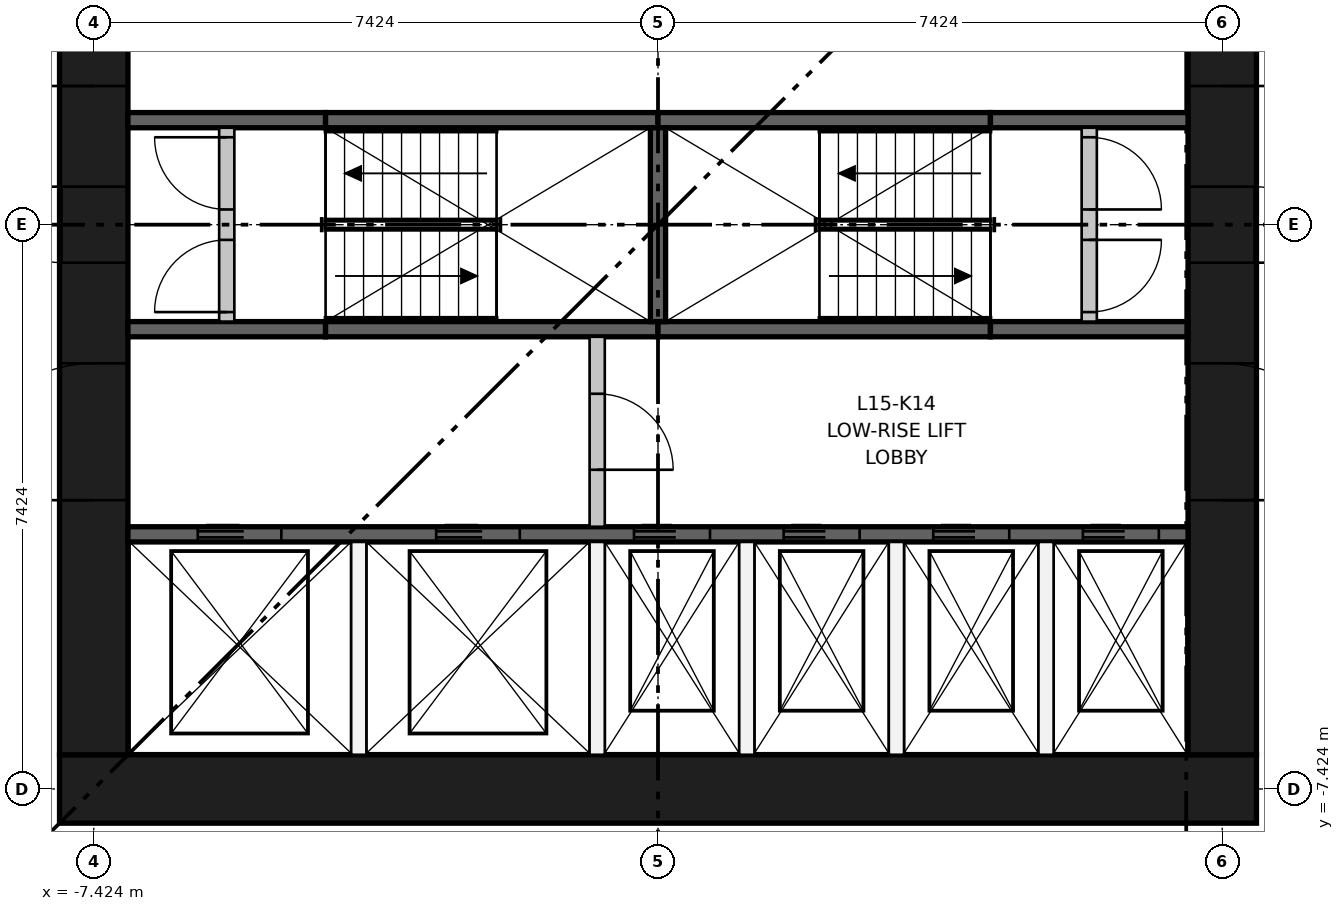
"""IFC4 building model, lengths in metres.
Left out: names, types, materials, properties, quantities, classifications, styles, units other than length and angle.
Written with IfcOpenShell. Run it as: python <this file> out.ifc"""

import sys

from ifc_helpers import new_model, si_unit, direction, frame, frame_2d, origin, place, context, subcontext, project, spatial, rectangle, extrude, element, fill, save


model = new_model("IFC4")
c1 = context("Model", 3, precision=1e-05, world=origin(), true_north=direction((0.0, 1.0)))
c2 = subcontext(c1, "Body", "Model", "MODEL_VIEW")
j1 = project(units=[si_unit("LENGTHUNIT", "METRE"), si_unit("PLANEANGLEUNIT", "RADIAN")], contexts=[c1])
p1 = place(None, origin())
s1 = spatial("IfcSite", under=j1, at=p1, CompositionType="ELEMENT")
p2 = place(p1, origin())
s2 = spatial("IfcBuilding", under=s1, at=p2, CompositionType="ELEMENT")
p3 = place(p2, frame((0.0, 0.0, 59.05)))
s3 = spatial("IfcBuildingStorey", under=s2, at=p3, CompositionType="ELEMENT", Elevation=59.05)
p4 = place(p3, frame((-7.874, -7.424, 0.0), z_axis=(0.0, 0.0, 1.0), x_axis=(1.0, 0.0, 0.0)))
e1 = element("IfcWall", 1, at=p4, inside=s3, PredefinedType="SHEAR", context=c2, shape_type="SweptSolid", body=[
    extrude(rectangle(XDim=15.748, YDim=0.9, at=frame_2d((7.874, 0.0))), origin(), (0.0, 0.0, 1.0), 3.65),
])
p5 = place(p3, frame((-7.424, -6.974, 0.0), z_axis=(0.0, 0.0, 1.0), x_axis=(0.0, 1.0, 0.0)))
e2 = element("IfcWall", 2, at=p5, inside=s3, PredefinedType="SHEAR", context=c2, shape_type="SweptSolid", body=[
    extrude(rectangle(XDim=13.948, YDim=0.9, at=frame_2d((6.974, 0.0))), origin(), (0.0, 0.0, 1.0), 3.65),
])
p6 = place(p5, frame((6.474, 0.0, 0.0)))
e3 = element("IfcOpeningElement", 3, at=p6, cuts=e2, PredefinedType="OPENING", context=c2, shape_type="SweptSolid", body=[
    extrude(rectangle(XDim=1.0, YDim=2.1, at=frame_2d((0.5, 1.05))), frame((0.0, 0.46, 0.0), z_axis=(0.0, -1.0, 0.0), x_axis=(1.0, 0.0, 0.0)), (0.0, 0.0, 1.0), 0.92),
])
p7 = place(p5, frame((3.35, 0.0, 0.0)))
e4 = element("IfcOpeningElement", 4, at=p7, cuts=e2, PredefinedType="OPENING", context=c2, shape_type="SweptSolid", body=[
    extrude(rectangle(XDim=1.8, YDim=2.1, at=frame_2d((0.9, 1.05))), frame((0.0, 0.46, 0.0), z_axis=(0.0, -1.0, 0.0), x_axis=(1.0, 0.0, 0.0)), (0.0, 0.0, 1.0), 0.92),
])
p8 = place(p5, frame((8.799, 0.0, 0.0)))
e5 = element("IfcOpeningElement", 5, at=p8, cuts=e2, PredefinedType="OPENING", context=c2, shape_type="SweptSolid", body=[
    extrude(rectangle(XDim=1.8, YDim=2.1, at=frame_2d((0.9, 1.05))), frame((0.0, 0.46, 0.0), z_axis=(0.0, -1.0, 0.0), x_axis=(1.0, 0.0, 0.0)), (0.0, 0.0, 1.0), 0.92),
])
p9 = place(p5, frame((11.974, 0.0, 0.0)))
e6 = element("IfcOpeningElement", 6, at=p9, cuts=e2, PredefinedType="OPENING", context=c2, shape_type="SweptSolid", body=[
    extrude(rectangle(XDim=1.0, YDim=2.1, at=frame_2d((0.5, 1.05))), frame((0.0, 0.46, 0.0), z_axis=(0.0, -1.0, 0.0), x_axis=(1.0, 0.0, 0.0)), (0.0, 0.0, 1.0), 0.92),
])
p10 = place(p3, frame((7.424, -6.974, 0.0), z_axis=(0.0, 0.0, 1.0), x_axis=(0.0, 1.0, 0.0)))
e7 = element("IfcWall", 7, at=p10, inside=s3, PredefinedType="SHEAR", context=c2, shape_type="SweptSolid", body=[
    extrude(rectangle(XDim=13.948, YDim=0.9, at=frame_2d((6.974, 0.0))), origin(), (0.0, 0.0, 1.0), 3.65),
])
p11 = place(p10, frame((6.474, 0.0, 0.0)))
e8 = element("IfcOpeningElement", 8, at=p11, cuts=e7, PredefinedType="OPENING", context=c2, shape_type="SweptSolid", body=[
    extrude(rectangle(XDim=1.0, YDim=2.1, at=frame_2d((0.5, 1.05))), frame((0.0, 0.46, 0.0), z_axis=(0.0, -1.0, 0.0), x_axis=(1.0, 0.0, 0.0)), (0.0, 0.0, 1.0), 0.92),
])
p12 = place(p10, frame((3.35, 0.0, 0.0)))
e9 = element("IfcOpeningElement", 9, at=p12, cuts=e7, PredefinedType="OPENING", context=c2, shape_type="SweptSolid", body=[
    extrude(rectangle(XDim=1.8, YDim=2.1, at=frame_2d((0.9, 1.05))), frame((0.0, 0.46, 0.0), z_axis=(0.0, -1.0, 0.0), x_axis=(1.0, 0.0, 0.0)), (0.0, 0.0, 1.0), 0.92),
])
p13 = place(p10, frame((8.799, 0.0, 0.0)))
e10 = element("IfcOpeningElement", 10, at=p13, cuts=e7, PredefinedType="OPENING", context=c2, shape_type="SweptSolid", body=[
    extrude(rectangle(XDim=1.8, YDim=2.1, at=frame_2d((0.9, 1.05))), frame((0.0, 0.46, 0.0), z_axis=(0.0, -1.0, 0.0), x_axis=(1.0, 0.0, 0.0)), (0.0, 0.0, 1.0), 0.92),
])
p14 = place(p3, frame((-6.974, -4.074, 0.0), z_axis=(0.0, 0.0, 1.0), x_axis=(1.0, 0.0, 0.0)))
e11 = element("IfcWall", 11, at=p14, inside=s3, PredefinedType="SHEAR", context=c2, shape_type="SweptSolid", body=[
    extrude(rectangle(XDim=13.948, YDim=0.2, at=frame_2d((6.974, 0.0))), origin(), (0.0, 0.0, 1.0), 3.3),
])
p15 = place(p14, frame((0.918, 0.0, 0.0)))
e12 = element("IfcOpeningElement", 12, at=p15, cuts=e11, PredefinedType="OPENING", context=c2, shape_type="SweptSolid", body=[
    extrude(rectangle(XDim=1.1, YDim=2.1, at=frame_2d((0.55, 1.05))), frame((0.0, 0.11, 0.0), z_axis=(0.0, -1.0, 0.0), x_axis=(1.0, 0.0, 0.0)), (0.0, 0.0, 1.0), 0.22),
])
p16 = place(p14, frame((4.055, 0.0, 0.0)))
e13 = element("IfcOpeningElement", 13, at=p16, cuts=e11, PredefinedType="OPENING", context=c2, shape_type="SweptSolid", body=[
    extrude(rectangle(XDim=1.1, YDim=2.1, at=frame_2d((0.55, 1.05))), frame((0.0, 0.11, 0.0), z_axis=(0.0, -1.0, 0.0), x_axis=(1.0, 0.0, 0.0)), (0.0, 0.0, 1.0), 0.22),
])
p17 = place(p14, frame((6.658, 0.0, 0.0)))
e14 = element("IfcOpeningElement", 14, at=p17, cuts=e11, PredefinedType="OPENING", context=c2, shape_type="SweptSolid", body=[
    extrude(rectangle(XDim=1.0, YDim=2.1, at=frame_2d((0.5, 1.05))), frame((0.0, 0.11, 0.0), z_axis=(0.0, -1.0, 0.0), x_axis=(1.0, 0.0, 0.0)), (0.0, 0.0, 1.0), 0.22),
])
p18 = place(p14, frame((8.627, 0.0, 0.0)))
e15 = element("IfcOpeningElement", 15, at=p18, cuts=e11, PredefinedType="OPENING", context=c2, shape_type="SweptSolid", body=[
    extrude(rectangle(XDim=1.0, YDim=2.1, at=frame_2d((0.5, 1.05))), frame((0.0, 0.11, 0.0), z_axis=(0.0, -1.0, 0.0), x_axis=(1.0, 0.0, 0.0)), (0.0, 0.0, 1.0), 0.22),
])
p19 = place(p14, frame((10.595, 0.0, 0.0)))
e16 = element("IfcOpeningElement", 16, at=p19, cuts=e11, PredefinedType="OPENING", context=c2, shape_type="SweptSolid", body=[
    extrude(rectangle(XDim=1.0, YDim=2.1, at=frame_2d((0.5, 1.05))), frame((0.0, 0.11, 0.0), z_axis=(0.0, -1.0, 0.0), x_axis=(1.0, 0.0, 0.0)), (0.0, 0.0, 1.0), 0.22),
])
p20 = place(p14, frame((12.564, 0.0, 0.0)))
e17 = element("IfcOpeningElement", 17, at=p20, cuts=e11, PredefinedType="OPENING", context=c2, shape_type="SweptSolid", body=[
    extrude(rectangle(XDim=1.0, YDim=2.1, at=frame_2d((0.5, 1.05))), frame((0.0, 0.11, 0.0), z_axis=(0.0, -1.0, 0.0), x_axis=(1.0, 0.0, 0.0)), (0.0, 0.0, 1.0), 0.22),
])
p21 = place(p3, frame((-6.974, -1.375, 0.0), z_axis=(0.0, 0.0, 1.0), x_axis=(1.0, 0.0, 0.0)))
e18 = element("IfcWall", 18, at=p21, inside=s3, PredefinedType="SHEAR", context=c2, shape_type="SweptSolid", body=[
    extrude(rectangle(XDim=2.6, YDim=0.2, at=frame_2d((1.3, 0.0))), origin(), (0.0, 0.0, 1.0), 3.3),
])
for number, where, z_axis, x_axis in (
    (19, (-4.374, -1.375, 0.0), (0.0, 0.0, 1.0), (1.0, 0.0, 0.0)),
    (20, (0.0, -1.375, 0.0), (0.0, 0.0, 1.0), (1.0, 0.0, 0.0)),
):
    element("IfcWall", number, at=place(p3, frame(where, z_axis=z_axis, x_axis=x_axis)), inside=s3, PredefinedType="SHEAR", context=c2, shape_type="SweptSolid", body=[
        extrude(rectangle(XDim=4.374, YDim=0.2, at=frame_2d((2.187, 0.0))), origin(), (0.0, 0.0, 1.0), 3.3),
    ])
for number, where, z_axis, x_axis in (
    (21, (4.374, -1.375, 0.0), (0.0, 0.0, 1.0), (1.0, 0.0, 0.0)),
    (22, (-6.974, 1.375, 0.0), (0.0, 0.0, 1.0), (1.0, 0.0, 0.0)),
):
    element("IfcWall", number, at=place(p3, frame(where, z_axis=z_axis, x_axis=x_axis)), inside=s3, PredefinedType="SHEAR", context=c2, shape_type="SweptSolid", body=[
        extrude(rectangle(XDim=2.6, YDim=0.2, at=frame_2d((1.3, 0.0))), origin(), (0.0, 0.0, 1.0), 3.3),
    ])
for number, where, z_axis, x_axis in (
    (23, (-4.374, 1.375, 0.0), (0.0, 0.0, 1.0), (1.0, 0.0, 0.0)),
    (24, (0.0, 1.375, 0.0), (0.0, 0.0, 1.0), (1.0, 0.0, 0.0)),
):
    element("IfcWall", number, at=place(p3, frame(where, z_axis=z_axis, x_axis=x_axis)), inside=s3, PredefinedType="SHEAR", context=c2, shape_type="SweptSolid", body=[
        extrude(rectangle(XDim=4.374, YDim=0.2, at=frame_2d((2.187, 0.0))), origin(), (0.0, 0.0, 1.0), 3.3),
    ])
p22 = place(p3, frame((4.374, 1.375, 0.0), z_axis=(0.0, 0.0, 1.0), x_axis=(1.0, 0.0, 0.0)))
e25 = element("IfcWall", 25, at=p22, inside=s3, PredefinedType="SHEAR", context=c2, shape_type="SweptSolid", body=[
    extrude(rectangle(XDim=2.6, YDim=0.2, at=frame_2d((1.3, 0.0))), origin(), (0.0, 0.0, 1.0), 3.3),
])
p23 = place(p3, frame((0.0, -1.275, 0.0), z_axis=(0.0, 0.0, 1.0), x_axis=(0.0, 1.0, 0.0)))
e26 = element("IfcWall", 26, at=p23, inside=s3, PredefinedType="SHEAR", context=c2, shape_type="SweptSolid", body=[
    extrude(rectangle(XDim=2.55, YDim=0.2, at=frame_2d((1.275, 0.0))), origin(), (0.0, 0.0, 1.0), 3.3),
])
for number, where, z_axis, x_axis in (
    (27, (-3.937, -6.974, 0.0), (0.0, 0.0, 1.0), (0.0, 1.0, 0.0)),
    (28, (-0.8, -6.974, 0.0), (0.0, 0.0, 1.0), (0.0, 1.0, 0.0)),
):
    element("IfcWall", number, at=place(p3, frame(where, z_axis=z_axis, x_axis=x_axis)), inside=s3, PredefinedType="PARTITIONING", context=c2, shape_type="SweptSolid", body=[
        extrude(rectangle(XDim=2.8, YDim=0.2, at=frame_2d((1.4, 0.0))), origin(), (0.0, 0.0, 1.0), 3.3),
    ])
p24 = place(p3, frame((-0.8, -3.974, 0.0), z_axis=(0.0, 0.0, 1.0), x_axis=(0.0, 1.0, 0.0)))
e29 = element("IfcWall", 29, at=p24, inside=s3, PredefinedType="PARTITIONING", context=c2, shape_type="SweptSolid", body=[
    extrude(rectangle(XDim=2.499, YDim=0.2, at=frame_2d((1.25, 0.0))), origin(), (0.0, 0.0, 1.0), 3.3),
])
p25 = place(p24, frame((0.75, 0.0, 0.0)))
e30 = element("IfcOpeningElement", 30, at=p25, cuts=e29, PredefinedType="OPENING", context=c2, shape_type="SweptSolid", body=[
    extrude(rectangle(XDim=1.0, YDim=2.1, at=frame_2d((0.5, 1.05))), frame((0.0, 0.11, 0.0), z_axis=(0.0, -1.0, 0.0), x_axis=(1.0, 0.0, 0.0)), (0.0, 0.0, 1.0), 0.22),
])
for number, where, z_axis, x_axis in (
    (31, (1.168, -6.974, 0.0), (0.0, 0.0, 1.0), (0.0, 1.0, 0.0)),
    (32, (3.137, -6.974, 0.0), (0.0, 0.0, 1.0), (0.0, 1.0, 0.0)),
    (33, (5.105, -6.974, 0.0), (0.0, 0.0, 1.0), (0.0, 1.0, 0.0)),
):
    element("IfcWall", number, at=place(p3, frame(where, z_axis=z_axis, x_axis=x_axis)), inside=s3, PredefinedType="PARTITIONING", context=c2, shape_type="SweptSolid", body=[
        extrude(rectangle(XDim=2.8, YDim=0.2, at=frame_2d((1.4, 0.0))), origin(), (0.0, 0.0, 1.0), 3.3),
    ])
p26 = place(p3, frame((-5.674, -1.275, 0.0), z_axis=(0.0, 0.0, 1.0), x_axis=(0.0, 1.0, 0.0)))
e34 = element("IfcWall", 34, at=p26, inside=s3, PredefinedType="PARTITIONING", context=c2, shape_type="SweptSolid", body=[
    extrude(rectangle(XDim=2.55, YDim=0.2, at=frame_2d((1.275, 0.0))), origin(), (0.0, 0.0, 1.0), 3.3),
])
p27 = place(p26, frame((0.125, 0.0, 0.0)))
e35 = element("IfcOpeningElement", 35, at=p27, cuts=e34, PredefinedType="OPENING", context=c2, shape_type="SweptSolid", body=[
    extrude(rectangle(XDim=0.95, YDim=2.1, at=frame_2d((0.475, 1.05))), frame((0.0, 0.11, 0.0), z_axis=(0.0, -1.0, 0.0), x_axis=(1.0, 0.0, 0.0)), (0.0, 0.0, 1.0), 0.22),
])
p28 = place(p26, frame((1.475, 0.0, 0.0)))
e36 = element("IfcOpeningElement", 36, at=p28, cuts=e34, PredefinedType="OPENING", context=c2, shape_type="SweptSolid", body=[
    extrude(rectangle(XDim=0.95, YDim=2.1, at=frame_2d((0.475, 1.05))), frame((0.0, 0.11, 0.0), z_axis=(0.0, -1.0, 0.0), x_axis=(1.0, 0.0, 0.0)), (0.0, 0.0, 1.0), 0.22),
])
p29 = place(p3, frame((5.674, -1.275, 0.0), z_axis=(0.0, 0.0, 1.0), x_axis=(0.0, 1.0, 0.0)))
e37 = element("IfcWall", 37, at=p29, inside=s3, PredefinedType="PARTITIONING", context=c2, shape_type="SweptSolid", body=[
    extrude(rectangle(XDim=2.55, YDim=0.2, at=frame_2d((1.275, 0.0))), origin(), (0.0, 0.0, 1.0), 3.3),
])
p30 = place(p29, frame((0.125, 0.0, 0.0)))
e38 = element("IfcOpeningElement", 38, at=p30, cuts=e37, PredefinedType="OPENING", context=c2, shape_type="SweptSolid", body=[
    extrude(rectangle(XDim=0.95, YDim=2.1, at=frame_2d((0.475, 1.05))), frame((0.0, 0.11, 0.0), z_axis=(0.0, -1.0, 0.0), x_axis=(1.0, 0.0, 0.0)), (0.0, 0.0, 1.0), 0.22),
])
p31 = place(p29, frame((1.475, 0.0, 0.0)))
e39 = element("IfcOpeningElement", 39, at=p31, cuts=e37, PredefinedType="OPENING", context=c2, shape_type="SweptSolid", body=[
    extrude(rectangle(XDim=0.95, YDim=2.1, at=frame_2d((0.475, 1.05))), frame((0.0, 0.11, 0.0), z_axis=(0.0, -1.0, 0.0), x_axis=(1.0, 0.0, 0.0)), (0.0, 0.0, 1.0), 0.22),
])
p32 = place(p15, origin())
e40 = element("IfcDoor", 40, at=p32, inside=s3, OperationType="DOUBLE_DOOR_SLIDING", PredefinedType="DOOR", context=c2, shape_type="SweptSolid", body=[
    extrude(rectangle(XDim=1.1, YDim=2.1, at=frame_2d((0.55, 1.05))), frame((0.0, 0.025, 0.0), z_axis=(0.0, -1.0, 0.0), x_axis=(1.0, 0.0, 0.0)), (0.0, 0.0, 1.0), 0.05),
])
fill(e12, e40)
p33 = place(p16, origin())
e41 = element("IfcDoor", 41, at=p33, inside=s3, OperationType="DOUBLE_DOOR_SLIDING", PredefinedType="DOOR", context=c2, shape_type="SweptSolid", body=[
    extrude(rectangle(XDim=1.1, YDim=2.1, at=frame_2d((0.55, 1.05))), frame((0.0, 0.025, 0.0), z_axis=(0.0, -1.0, 0.0), x_axis=(1.0, 0.0, 0.0)), (0.0, 0.0, 1.0), 0.05),
])
fill(e13, e41)
p34 = place(p17, origin())
e42 = element("IfcDoor", 42, at=p34, inside=s3, OperationType="DOUBLE_DOOR_SLIDING", PredefinedType="DOOR", context=c2, shape_type="SweptSolid", body=[
    extrude(rectangle(XDim=1.0, YDim=2.1, at=frame_2d((0.5, 1.05))), frame((0.0, 0.025, 0.0), z_axis=(0.0, -1.0, 0.0), x_axis=(1.0, 0.0, 0.0)), (0.0, 0.0, 1.0), 0.05),
])
fill(e14, e42)
p35 = place(p18, origin())
e43 = element("IfcDoor", 43, at=p35, inside=s3, OperationType="DOUBLE_DOOR_SLIDING", PredefinedType="DOOR", context=c2, shape_type="SweptSolid", body=[
    extrude(rectangle(XDim=1.0, YDim=2.1, at=frame_2d((0.5, 1.05))), frame((0.0, 0.025, 0.0), z_axis=(0.0, -1.0, 0.0), x_axis=(1.0, 0.0, 0.0)), (0.0, 0.0, 1.0), 0.05),
])
fill(e15, e43)
p36 = place(p19, origin())
e44 = element("IfcDoor", 44, at=p36, inside=s3, OperationType="DOUBLE_DOOR_SLIDING", PredefinedType="DOOR", context=c2, shape_type="SweptSolid", body=[
    extrude(rectangle(XDim=1.0, YDim=2.1, at=frame_2d((0.5, 1.05))), frame((0.0, 0.025, 0.0), z_axis=(0.0, -1.0, 0.0), x_axis=(1.0, 0.0, 0.0)), (0.0, 0.0, 1.0), 0.05),
])
fill(e16, e44)
p37 = place(p20, origin())
e45 = element("IfcDoor", 45, at=p37, inside=s3, OperationType="DOUBLE_DOOR_SLIDING", PredefinedType="DOOR", context=c2, shape_type="SweptSolid", body=[
    extrude(rectangle(XDim=1.0, YDim=2.1, at=frame_2d((0.5, 1.05))), frame((0.0, 0.025, 0.0), z_axis=(0.0, -1.0, 0.0), x_axis=(1.0, 0.0, 0.0)), (0.0, 0.0, 1.0), 0.05),
])
fill(e17, e45)
p38 = place(p27, origin())
e46 = element("IfcDoor", 46, at=p38, inside=s3, OperationType="SINGLE_SWING_LEFT", PredefinedType="DOOR", context=c2, shape_type="SweptSolid", body=[
    extrude(rectangle(XDim=0.95, YDim=2.1, at=frame_2d((0.475, 1.05))), frame((0.0, 0.025, 0.0), z_axis=(0.0, -1.0, 0.0), x_axis=(1.0, 0.0, 0.0)), (0.0, 0.0, 1.0), 0.05),
])
fill(e35, e46)
p39 = place(p28, origin())
e47 = element("IfcDoor", 47, at=p39, inside=s3, OperationType="SINGLE_SWING_RIGHT", PredefinedType="DOOR", context=c2, shape_type="SweptSolid", body=[
    extrude(rectangle(XDim=0.95, YDim=2.1, at=frame_2d((0.475, 1.05))), frame((0.0, 0.025, 0.0), z_axis=(0.0, -1.0, 0.0), x_axis=(1.0, 0.0, 0.0)), (0.0, 0.0, 1.0), 0.05),
])
fill(e36, e47)
p40 = place(p30, frame((0.95, 0.0, 0.0), z_axis=(0.0, 0.0, 1.0), x_axis=(-1.0, 0.0, 0.0)))
e48 = element("IfcDoor", 48, at=p40, inside=s3, OperationType="SINGLE_SWING_RIGHT", PredefinedType="DOOR", context=c2, shape_type="SweptSolid", body=[
    extrude(rectangle(XDim=0.95, YDim=2.1, at=frame_2d((0.475, 1.05))), frame((0.0, 0.025, 0.0), z_axis=(0.0, -1.0, 0.0), x_axis=(1.0, 0.0, 0.0)), (0.0, 0.0, 1.0), 0.05),
])
fill(e38, e48)
p41 = place(p31, frame((0.95, 0.0, 0.0), z_axis=(0.0, 0.0, 1.0), x_axis=(-1.0, 0.0, 0.0)))
e49 = element("IfcDoor", 49, at=p41, inside=s3, OperationType="SINGLE_SWING_LEFT", PredefinedType="DOOR", context=c2, shape_type="SweptSolid", body=[
    extrude(rectangle(XDim=0.95, YDim=2.1, at=frame_2d((0.475, 1.05))), frame((0.0, 0.025, 0.0), z_axis=(0.0, -1.0, 0.0), x_axis=(1.0, 0.0, 0.0)), (0.0, 0.0, 1.0), 0.05),
])
fill(e39, e49)
p42 = place(p25, frame((1.0, 0.0, 0.0), z_axis=(0.0, 0.0, 1.0), x_axis=(-1.0, 0.0, 0.0)))
e50 = element("IfcDoor", 50, at=p42, inside=s3, OperationType="SINGLE_SWING_LEFT", PredefinedType="DOOR", context=c2, shape_type="SweptSolid", body=[
    extrude(rectangle(XDim=1.0, YDim=2.1, at=frame_2d((0.5, 1.05))), frame((0.0, 0.025, 0.0), z_axis=(0.0, -1.0, 0.0), x_axis=(1.0, 0.0, 0.0)), (0.0, 0.0, 1.0), 0.05),
])
fill(e30, e50)
p43 = place(p6, origin())
e51 = element("IfcDoor", 51, at=p43, inside=s3, OperationType="SINGLE_SWING_RIGHT", PredefinedType="DOOR", context=c2, shape_type="SweptSolid", body=[
    extrude(rectangle(XDim=1.0, YDim=2.1, at=frame_2d((0.5, 1.05))), frame((0.0, 0.45, 0.0), z_axis=(0.0, -1.0, 0.0), x_axis=(1.0, 0.0, 0.0)), (0.0, 0.0, 1.0), 0.05),
])
fill(e3, e51)
p44 = place(p7, origin())
e52 = element("IfcDoor", 52, at=p44, inside=s3, OperationType="DOUBLE_DOOR_SINGLE_SWING", PredefinedType="DOOR", context=c2, shape_type="SweptSolid", body=[
    extrude(rectangle(XDim=1.8, YDim=2.1, at=frame_2d((0.9, 1.05))), frame((0.0, 0.025, 0.0), z_axis=(0.0, -1.0, 0.0), x_axis=(1.0, 0.0, 0.0)), (0.0, 0.0, 1.0), 0.05),
])
fill(e4, e52)
p45 = place(p8, origin())
e53 = element("IfcDoor", 53, at=p45, inside=s3, OperationType="DOUBLE_DOOR_SINGLE_SWING", PredefinedType="DOOR", context=c2, shape_type="SweptSolid", body=[
    extrude(rectangle(XDim=1.8, YDim=2.1, at=frame_2d((0.9, 1.05))), frame((0.0, 0.025, 0.0), z_axis=(0.0, -1.0, 0.0), x_axis=(1.0, 0.0, 0.0)), (0.0, 0.0, 1.0), 0.05),
])
fill(e5, e53)
p46 = place(p11, frame((1.0, 0.0, 0.0), z_axis=(0.0, 0.0, 1.0), x_axis=(-1.0, 0.0, 0.0)))
e54 = element("IfcDoor", 54, at=p46, inside=s3, OperationType="SINGLE_SWING_LEFT", PredefinedType="DOOR", context=c2, shape_type="SweptSolid", body=[
    extrude(rectangle(XDim=1.0, YDim=2.1, at=frame_2d((0.5, 1.05))), frame((0.0, 0.45, 0.0), z_axis=(0.0, -1.0, 0.0), x_axis=(1.0, 0.0, 0.0)), (0.0, 0.0, 1.0), 0.05),
])
fill(e8, e54)
p47 = place(p12, frame((1.8, 0.0, 0.0), z_axis=(0.0, 0.0, 1.0), x_axis=(-1.0, 0.0, 0.0)))
e55 = element("IfcDoor", 55, at=p47, inside=s3, OperationType="DOUBLE_DOOR_SINGLE_SWING", PredefinedType="DOOR", context=c2, shape_type="SweptSolid", body=[
    extrude(rectangle(XDim=1.8, YDim=2.1, at=frame_2d((0.9, 1.05))), frame((0.0, 0.025, 0.0), z_axis=(0.0, -1.0, 0.0), x_axis=(1.0, 0.0, 0.0)), (0.0, 0.0, 1.0), 0.05),
])
fill(e9, e55)
p48 = place(p13, frame((1.8, 0.0, 0.0), z_axis=(0.0, 0.0, 1.0), x_axis=(-1.0, 0.0, 0.0)))
e56 = element("IfcDoor", 56, at=p48, inside=s3, OperationType="DOUBLE_DOOR_SINGLE_SWING", PredefinedType="DOOR", context=c2, shape_type="SweptSolid", body=[
    extrude(rectangle(XDim=1.8, YDim=2.1, at=frame_2d((0.9, 1.05))), frame((0.0, 0.025, 0.0), z_axis=(0.0, -1.0, 0.0), x_axis=(1.0, 0.0, 0.0)), (0.0, 0.0, 1.0), 0.05),
])
fill(e10, e56)
save(model, sys.argv[1])
